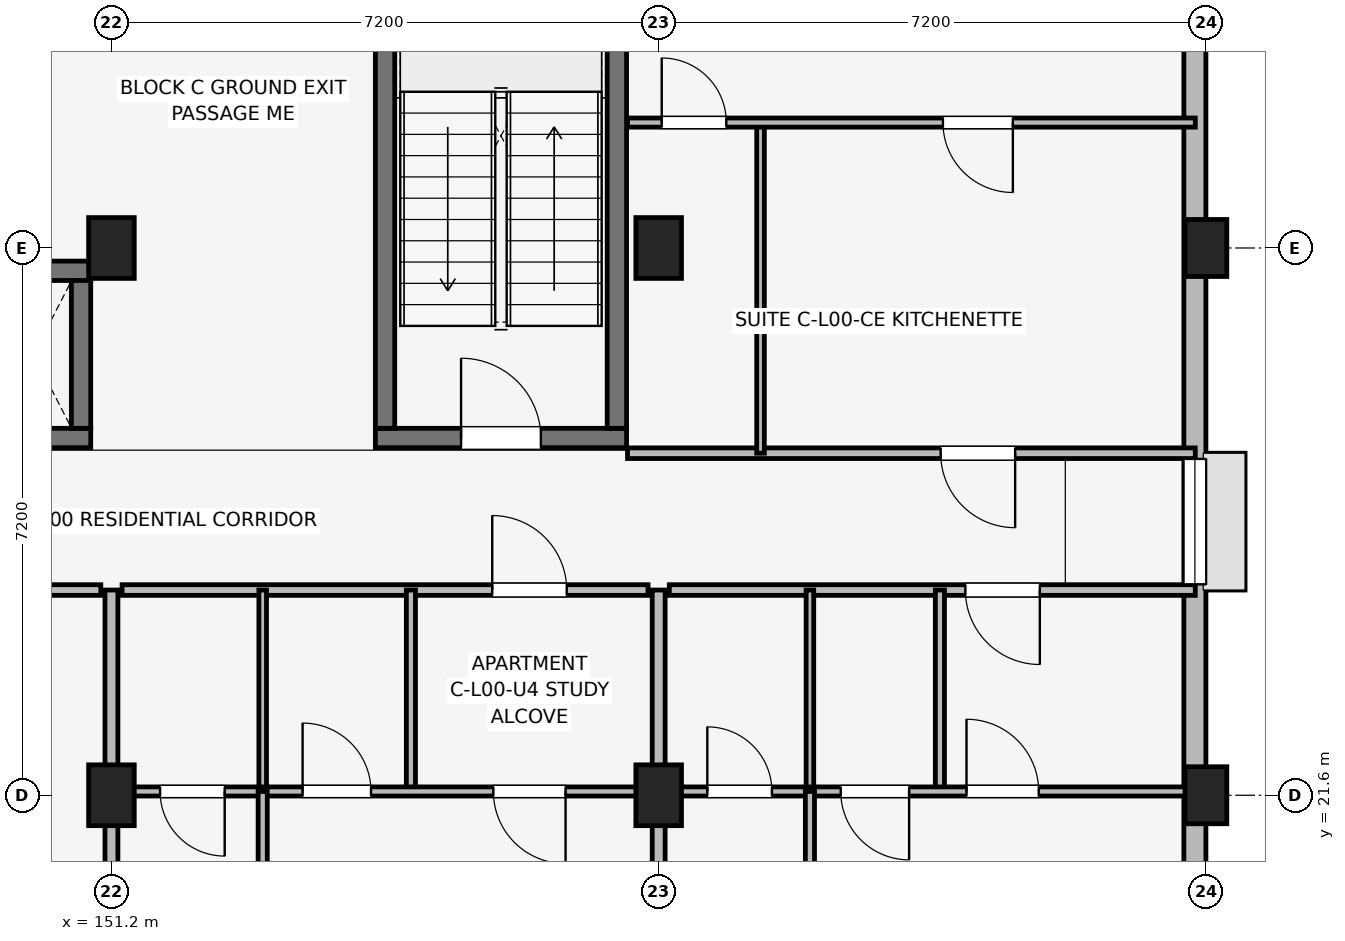
"""IFC4 building model, lengths in metres.
Left out: names, types, materials, properties, quantities, classifications, styles, units other than length and angle.
Written with IfcOpenShell. Run it as: python <this file> out.ifc"""

import sys

from ifc_helpers import new_model, si_unit, direction, frame, frame_2d, origin, origin_2d, place, context, subcontext, project, spatial, rectangle, extrude, element, fill, save


model = new_model("IFC4")
c1 = context("Model", 3, precision=1e-05, world=origin(), true_north=direction((0.0, 1.0)))
c2 = subcontext(c1, "Body", "Model", "MODEL_VIEW")
j1 = project(units=[si_unit("LENGTHUNIT", "METRE"), si_unit("PLANEANGLEUNIT", "RADIAN")], contexts=[c1])
p1 = place(None, origin())
s1 = spatial("IfcSite", under=j1, at=p1, CompositionType="ELEMENT")
p2 = place(p1, origin())
s2 = spatial("IfcBuilding", under=s1, at=p2, CompositionType="ELEMENT")
p3 = place(p2, origin())
s3 = spatial("IfcBuildingStorey", under=s2, at=p3, CompositionType="ELEMENT", Elevation=0.0)
for number, where, z_axis, x_axis in (
    (1, (151.2, 21.6, 0.0), (0.0, 0.0, 1.0), (1.0, 0.0, 0.0)),
    (2, (151.2, 28.8, 0.0), (0.0, 0.0, 1.0), (1.0, 0.0, 0.0)),
    (3, (158.4, 21.6, 0.0), (0.0, 0.0, 1.0), (1.0, 0.0, 0.0)),
    (4, (158.4, 28.8, 0.0), (0.0, 0.0, 1.0), (1.0, 0.0, 0.0)),
):
    element("IfcColumn", number, at=place(p3, frame(where, z_axis=z_axis, x_axis=x_axis)), inside=s3, PredefinedType="COLUMN", context=c2, shape_type="SweptSolid", body=[
        extrude(rectangle(XDim=0.6, YDim=0.8, at=origin_2d()), origin(), (0.0, 0.0, 1.0), 4.5),
    ])
for number, where, z_axis, x_axis in (
    (5, (165.6, 21.6, 0.0), (0.0, 0.0, 1.0), (1.0, 0.0, 0.0)),
    (6, (165.6, 28.8, 0.0), (0.0, 0.0, 1.0), (1.0, 0.0, 0.0)),
):
    element("IfcColumn", number, at=place(p3, frame(where, z_axis=z_axis, x_axis=x_axis)), inside=s3, PredefinedType="COLUMN", context=c2, shape_type="SweptSolid", body=[
        extrude(rectangle(XDim=0.55, YDim=0.75, at=origin_2d()), origin(), (0.0, 0.0, 1.0), 4.5),
    ])
p4 = place(p3, frame((154.673, 26.3, 0.0), z_axis=(0.0, 0.0, 1.0), x_axis=(1.0, 0.0, 0.0)))
e7 = element("IfcWall", 7, at=p4, inside=s3, PredefinedType="SHEAR", context=c2, shape_type="SweptSolid", body=[
    extrude(rectangle(XDim=3.305, YDim=0.255, at=frame_2d((1.652, 0.0))), origin(), (0.0, 0.0, 1.0), 4.5),
])
p5 = place(p4, frame((1.127, 0.0, 0.0)))
e8 = element("IfcOpeningElement", 8, at=p5, cuts=e7, PredefinedType="OPENING", context=c2, shape_type="SweptSolid", body=[
    extrude(rectangle(XDim=1.05, YDim=2.12, at=frame_2d((0.525, 1.06))), frame((0.0, 0.137, 0.0), z_axis=(0.0, -1.0, 0.0), x_axis=(1.0, 0.0, 0.0)), (0.0, 0.0, 1.0), 0.275),
])
for number, where, z_axis, x_axis in (
    (9, (154.8, 26.427, 0.0), (0.0, 0.0, 1.0), (0.0, 1.0, 0.0)),
    (10, (157.85, 26.427, 0.0), (0.0, 0.0, 1.0), (0.0, 1.0, 0.0)),
):
    element("IfcWall", number, at=place(p3, frame(where, z_axis=z_axis, x_axis=x_axis)), inside=s3, PredefinedType="SHEAR", context=c2, shape_type="SweptSolid", body=[
        extrude(rectangle(XDim=6.295, YDim=0.255, at=frame_2d((3.147, 0.0))), origin(), (0.0, 0.0, 1.0), 4.5),
    ])
for number, where, z_axis, x_axis in (
    (11, (149.123, 26.3, 0.0), (0.0, 0.0, 1.0), (1.0, 0.0, 0.0)),
    (12, (149.123, 28.5, 0.0), (0.0, 0.0, 1.0), (1.0, 0.0, 0.0)),
):
    element("IfcWall", number, at=place(p3, frame(where, z_axis=z_axis, x_axis=x_axis)), inside=s3, PredefinedType="SHEAR", context=c2, shape_type="SweptSolid", body=[
        extrude(rectangle(XDim=1.805, YDim=0.255, at=frame_2d((0.902, 0.0))), origin(), (0.0, 0.0, 1.0), 4.5),
    ])
p6 = place(p3, frame((150.8, 26.427, 0.0), z_axis=(0.0, 0.0, 1.0), x_axis=(0.0, 1.0, 0.0)))
e13 = element("IfcWall", 13, at=p6, inside=s3, PredefinedType="SHEAR", context=c2, shape_type="SweptSolid", body=[
    extrude(rectangle(XDim=1.945, YDim=0.255, at=frame_2d((0.973, 0.0))), origin(), (0.0, 0.0, 1.0), 4.5),
])
p7 = place(p3, frame((165.455, 17.4, 0.0), z_axis=(0.0, 0.0, 1.0), x_axis=(0.0, 1.0, 0.0)))
e14 = element("IfcWall", 14, at=p7, inside=s3, PredefinedType="SOLIDWALL", context=c2, shape_type="SweptSolid", body=[
    extrude(rectangle(XDim=15.6, YDim=0.29, at=frame_2d((7.8, 0.0))), origin(), (0.0, 0.0, 1.0), 3.38),
])
p8 = place(p7, frame((6.975, 0.0, 1.05)))
e15 = element("IfcOpeningElement", 15, at=p8, cuts=e14, PredefinedType="OPENING", context=c2, shape_type="SweptSolid", body=[
    extrude(rectangle(XDim=1.65, YDim=1.15, at=frame_2d((0.825, 0.575))), frame((0.0, 0.155, 0.0), z_axis=(0.0, -1.0, 0.0), x_axis=(1.0, 0.0, 0.0)), (0.0, 0.0, 1.0), 0.31),
])
p9 = place(p7, frame((1.288, 0.0, 0.75)))
e16 = element("IfcOpeningElement", 16, at=p9, cuts=e14, PredefinedType="OPENING", context=c2, shape_type="SweptSolid", body=[
    extrude(rectangle(XDim=1.42, YDim=1.6, at=frame_2d((0.71, 0.8))), frame((0.0, 0.155, 0.0), z_axis=(0.0, -1.0, 0.0), x_axis=(1.0, 0.0, 0.0)), (0.0, 0.0, 1.0), 0.31),
])
p10 = place(p3, frame((144.14, 24.3, 0.0), z_axis=(0.0, 0.0, 1.0), x_axis=(1.0, 0.0, 0.0)))
e17 = element("IfcWall", 17, at=p10, inside=s3, PredefinedType="PARTITIONING", context=c2, shape_type="SweptSolid", body=[
    extrude(rectangle(XDim=6.92, YDim=0.14, at=frame_2d((3.46, 0.0))), origin(), (0.0, 0.0, 1.0), 3.15),
])
p11 = place(p10, frame((1.25, 0.0, 0.0)))
e18 = element("IfcOpeningElement", 18, at=p11, cuts=e17, PredefinedType="OPENING", context=c2, shape_type="SweptSolid", body=[
    extrude(rectangle(XDim=1.4, YDim=2.22, at=frame_2d((0.7, 1.11))), frame((0.0, 0.08, 0.0), z_axis=(0.0, -1.0, 0.0), x_axis=(1.0, 0.0, 0.0)), (0.0, 0.0, 1.0), 0.16),
])
p12 = place(p10, frame((6.07, 0.0, 0.0), z_axis=(0.0, 0.0, 1.0), x_axis=(-1.0, 0.0, 0.0)))
e19 = element("IfcOpeningElement", 19, at=p12, cuts=e17, PredefinedType="OPENING", context=c2, shape_type="SweptSolid", body=[
    extrude(rectangle(XDim=1.0, YDim=2.12, at=frame_2d((0.5, 1.06))), frame((0.0, 0.08, 0.0), z_axis=(0.0, -1.0, 0.0), x_axis=(1.0, 0.0, 0.0)), (0.0, 0.0, 1.0), 0.16),
])
p13 = place(p3, frame((151.2, 14.7, 0.0), z_axis=(0.0, 0.0, 1.0), x_axis=(0.0, 1.0, 0.0)))
e20 = element("IfcWall", 20, at=p13, inside=s3, PredefinedType="PARTITIONING", context=c2, shape_type="SweptSolid", body=[
    extrude(rectangle(XDim=9.6, YDim=0.17, at=frame_2d((4.8, 0.0))), origin(), (0.0, 0.0, 1.0), 3.15),
])
p14 = place(p3, frame((151.34, 24.3, 0.0), z_axis=(0.0, 0.0, 1.0), x_axis=(1.0, 0.0, 0.0)))
e21 = element("IfcWall", 21, at=p14, inside=s3, PredefinedType="PARTITIONING", context=c2, shape_type="SweptSolid", body=[
    extrude(rectangle(XDim=6.92, YDim=0.14, at=frame_2d((3.46, 0.0))), origin(), (0.0, 0.0, 1.0), 3.15),
])
p15 = place(p14, frame((4.87, 0.0, 0.0)))
e22 = element("IfcOpeningElement", 22, at=p15, cuts=e21, PredefinedType="OPENING", context=c2, shape_type="SweptSolid", body=[
    extrude(rectangle(XDim=0.98, YDim=2.1, at=frame_2d((0.49, 1.05))), frame((0.0, 0.08, 0.0), z_axis=(0.0, -1.0, 0.0), x_axis=(1.0, 0.0, 0.0)), (0.0, 0.0, 1.0), 0.16),
])
p16 = place(p3, frame((153.19, 21.65, 0.0), z_axis=(0.0, 0.0, 1.0), x_axis=(0.0, 1.0, 0.0)))
e23 = element("IfcWall", 23, at=p16, inside=s3, PredefinedType="PARTITIONING", context=c2, shape_type="SweptSolid", body=[
    extrude(rectangle(XDim=2.65, YDim=0.1, at=frame_2d((1.325, 0.0))), origin(), (0.0, 0.0, 1.0), 3.15),
])
p17 = place(p3, frame((155.14, 21.65, 0.0), z_axis=(0.0, 0.0, 1.0), x_axis=(0.0, 1.0, 0.0)))
e24 = element("IfcWall", 24, at=p17, inside=s3, PredefinedType="PARTITIONING", context=c2, shape_type="SweptSolid", body=[
    extrude(rectangle(XDim=2.65, YDim=0.12, at=frame_2d((1.325, 0.0))), origin(), (0.0, 0.0, 1.0), 3.15),
])
p18 = place(p3, frame((151.34, 21.65, 0.0), z_axis=(0.0, 0.0, 1.0), x_axis=(1.0, 0.0, 0.0)))
e25 = element("IfcWall", 25, at=p18, inside=s3, PredefinedType="PARTITIONING", context=c2, shape_type="SweptSolid", body=[
    extrude(rectangle(XDim=6.92, YDim=0.12, at=frame_2d((3.46, 0.0))), origin(), (0.0, 0.0, 1.0), 3.15),
])
p19 = place(p18, frame((1.35, 0.0, 0.0), z_axis=(0.0, 0.0, 1.0), x_axis=(-1.0, 0.0, 0.0)))
e26 = element("IfcOpeningElement", 26, at=p19, cuts=e25, PredefinedType="OPENING", context=c2, shape_type="SweptSolid", body=[
    extrude(rectangle(XDim=0.85, YDim=2.08, at=frame_2d((0.425, 1.04))), frame((0.0, 0.07, 0.0), z_axis=(0.0, -1.0, 0.0), x_axis=(1.0, 0.0, 0.0)), (0.0, 0.0, 1.0), 0.14),
])
p20 = place(p18, frame((2.375, 0.0, 0.0)))
e27 = element("IfcOpeningElement", 27, at=p20, cuts=e25, PredefinedType="OPENING", context=c2, shape_type="SweptSolid", body=[
    extrude(rectangle(XDim=0.9, YDim=2.08, at=frame_2d((0.45, 1.04))), frame((0.0, 0.07, 0.0), z_axis=(0.0, -1.0, 0.0), x_axis=(1.0, 0.0, 0.0)), (0.0, 0.0, 1.0), 0.14),
])
p21 = place(p18, frame((5.835, 0.0, 0.0), z_axis=(0.0, 0.0, 1.0), x_axis=(-1.0, 0.0, 0.0)))
e28 = element("IfcOpeningElement", 28, at=p21, cuts=e25, PredefinedType="OPENING", context=c2, shape_type="SweptSolid", body=[
    extrude(rectangle(XDim=0.95, YDim=2.08, at=frame_2d((0.475, 1.04))), frame((0.0, 0.07, 0.0), z_axis=(0.0, -1.0, 0.0), x_axis=(1.0, 0.0, 0.0)), (0.0, 0.0, 1.0), 0.14),
])
p22 = place(p3, frame((153.19, 14.7, 0.0), z_axis=(0.0, 0.0, 1.0), x_axis=(0.0, 1.0, 0.0)))
e29 = element("IfcWall", 29, at=p22, inside=s3, PredefinedType="PARTITIONING", context=c2, shape_type="SweptSolid", body=[
    extrude(rectangle(XDim=6.95, YDim=0.12, at=frame_2d((3.475, 0.0))), origin(), (0.0, 0.0, 1.0), 3.15),
])
p23 = place(p22, frame((3.025, 0.0, 0.0)))
e30 = element("IfcOpeningElement", 30, at=p23, cuts=e29, PredefinedType="OPENING", context=c2, shape_type="SweptSolid", body=[
    extrude(rectangle(XDim=0.9, YDim=2.08, at=frame_2d((0.45, 1.04))), frame((0.0, 0.07, 0.0), z_axis=(0.0, -1.0, 0.0), x_axis=(1.0, 0.0, 0.0)), (0.0, 0.0, 1.0), 0.14),
])
p24 = place(p3, frame((158.4, 14.7, 0.0), z_axis=(0.0, 0.0, 1.0), x_axis=(0.0, 1.0, 0.0)))
e31 = element("IfcWall", 31, at=p24, inside=s3, PredefinedType="PARTITIONING", context=c2, shape_type="SweptSolid", body=[
    extrude(rectangle(XDim=9.6, YDim=0.17, at=frame_2d((4.8, 0.0))), origin(), (0.0, 0.0, 1.0), 3.15),
])
p25 = place(p3, frame((158.54, 24.3, 0.0), z_axis=(0.0, 0.0, 1.0), x_axis=(1.0, 0.0, 0.0)))
e32 = element("IfcWall", 32, at=p25, inside=s3, PredefinedType="PARTITIONING", context=c2, shape_type="SweptSolid", body=[
    extrude(rectangle(XDim=6.92, YDim=0.14, at=frame_2d((3.46, 0.0))), origin(), (0.0, 0.0, 1.0), 3.15),
])
p26 = place(p25, frame((4.875, 0.0, 0.0), z_axis=(0.0, 0.0, 1.0), x_axis=(-1.0, 0.0, 0.0)))
e33 = element("IfcOpeningElement", 33, at=p26, cuts=e32, PredefinedType="OPENING", context=c2, shape_type="SweptSolid", body=[
    extrude(rectangle(XDim=0.98, YDim=2.1, at=frame_2d((0.49, 1.05))), frame((0.0, 0.08, 0.0), z_axis=(0.0, -1.0, 0.0), x_axis=(1.0, 0.0, 0.0)), (0.0, 0.0, 1.0), 0.16),
])
p27 = place(p3, frame((160.39, 21.65, 0.0), z_axis=(0.0, 0.0, 1.0), x_axis=(0.0, 1.0, 0.0)))
e34 = element("IfcWall", 34, at=p27, inside=s3, PredefinedType="PARTITIONING", context=c2, shape_type="SweptSolid", body=[
    extrude(rectangle(XDim=2.65, YDim=0.1, at=frame_2d((1.325, 0.0))), origin(), (0.0, 0.0, 1.0), 3.15),
])
p28 = place(p3, frame((162.1, 21.65, 0.0), z_axis=(0.0, 0.0, 1.0), x_axis=(0.0, 1.0, 0.0)))
e35 = element("IfcWall", 35, at=p28, inside=s3, PredefinedType="PARTITIONING", context=c2, shape_type="SweptSolid", body=[
    extrude(rectangle(XDim=2.65, YDim=0.12, at=frame_2d((1.325, 0.0))), origin(), (0.0, 0.0, 1.0), 3.15),
])
p29 = place(p3, frame((158.54, 21.65, 0.0), z_axis=(0.0, 0.0, 1.0), x_axis=(1.0, 0.0, 0.0)))
e36 = element("IfcWall", 36, at=p29, inside=s3, PredefinedType="PARTITIONING", context=c2, shape_type="SweptSolid", body=[
    extrude(rectangle(XDim=6.92, YDim=0.12, at=frame_2d((3.46, 0.0))), origin(), (0.0, 0.0, 1.0), 3.15),
])
p30 = place(p29, frame((0.5, 0.0, 0.0)))
e37 = element("IfcOpeningElement", 37, at=p30, cuts=e36, PredefinedType="OPENING", context=c2, shape_type="SweptSolid", body=[
    extrude(rectangle(XDim=0.85, YDim=2.08, at=frame_2d((0.425, 1.04))), frame((0.0, 0.07, 0.0), z_axis=(0.0, -1.0, 0.0), x_axis=(1.0, 0.0, 0.0)), (0.0, 0.0, 1.0), 0.14),
])
p31 = place(p29, frame((3.155, 0.0, 0.0), z_axis=(0.0, 0.0, 1.0), x_axis=(-1.0, 0.0, 0.0)))
e38 = element("IfcOpeningElement", 38, at=p31, cuts=e36, PredefinedType="OPENING", context=c2, shape_type="SweptSolid", body=[
    extrude(rectangle(XDim=0.9, YDim=2.08, at=frame_2d((0.45, 1.04))), frame((0.0, 0.07, 0.0), z_axis=(0.0, -1.0, 0.0), x_axis=(1.0, 0.0, 0.0)), (0.0, 0.0, 1.0), 0.14),
])
p32 = place(p29, frame((3.91, 0.0, 0.0)))
e39 = element("IfcOpeningElement", 39, at=p32, cuts=e36, PredefinedType="OPENING", context=c2, shape_type="SweptSolid", body=[
    extrude(rectangle(XDim=0.95, YDim=2.08, at=frame_2d((0.475, 1.04))), frame((0.0, 0.07, 0.0), z_axis=(0.0, -1.0, 0.0), x_axis=(1.0, 0.0, 0.0)), (0.0, 0.0, 1.0), 0.14),
])
p33 = place(p3, frame((160.39, 14.7, 0.0), z_axis=(0.0, 0.0, 1.0), x_axis=(0.0, 1.0, 0.0)))
e40 = element("IfcWall", 40, at=p33, inside=s3, PredefinedType="PARTITIONING", context=c2, shape_type="SweptSolid", body=[
    extrude(rectangle(XDim=6.95, YDim=0.12, at=frame_2d((3.475, 0.0))), origin(), (0.0, 0.0, 1.0), 3.15),
])
p34 = place(p33, frame((3.025, 0.0, 0.0)))
e41 = element("IfcOpeningElement", 41, at=p34, cuts=e40, PredefinedType="OPENING", context=c2, shape_type="SweptSolid", body=[
    extrude(rectangle(XDim=0.9, YDim=2.08, at=frame_2d((0.45, 1.04))), frame((0.0, 0.07, 0.0), z_axis=(0.0, -1.0, 0.0), x_axis=(1.0, 0.0, 0.0)), (0.0, 0.0, 1.0), 0.14),
])
p35 = place(p3, frame((157.99, 26.1, 0.0), z_axis=(0.0, 0.0, 1.0), x_axis=(1.0, 0.0, 0.0)))
e42 = element("IfcWall", 42, at=p35, inside=s3, PredefinedType="PARTITIONING", context=c2, shape_type="SweptSolid", body=[
    extrude(rectangle(XDim=7.47, YDim=0.14, at=frame_2d((3.735, 0.0))), origin(), (0.0, 0.0, 1.0), 3.15),
])
p36 = place(p35, frame((5.1, 0.0, 0.0), z_axis=(0.0, 0.0, 1.0), x_axis=(-1.0, 0.0, 0.0)))
e43 = element("IfcOpeningElement", 43, at=p36, cuts=e42, PredefinedType="OPENING", context=c2, shape_type="SweptSolid", body=[
    extrude(rectangle(XDim=0.98, YDim=2.1, at=frame_2d((0.49, 1.05))), frame((0.0, 0.08, 0.0), z_axis=(0.0, -1.0, 0.0), x_axis=(1.0, 0.0, 0.0)), (0.0, 0.0, 1.0), 0.16),
])
p37 = place(p3, frame((159.74, 26.1, 0.0), z_axis=(0.0, 0.0, 1.0), x_axis=(0.0, 1.0, 0.0)))
e44 = element("IfcWall", 44, at=p37, inside=s3, PredefinedType="PARTITIONING", context=c2, shape_type="SweptSolid", body=[
    extrude(rectangle(XDim=4.35, YDim=0.1, at=frame_2d((2.175, 0.0))), origin(), (0.0, 0.0, 1.0), 3.15),
])
p38 = place(p3, frame((157.99, 30.45, 0.0), z_axis=(0.0, 0.0, 1.0), x_axis=(1.0, 0.0, 0.0)))
e45 = element("IfcWall", 45, at=p38, inside=s3, PredefinedType="PARTITIONING", context=c2, shape_type="SweptSolid", body=[
    extrude(rectangle(XDim=7.47, YDim=0.12, at=frame_2d((3.735, 0.0))), origin(), (0.0, 0.0, 1.0), 3.15),
])
p39 = place(p38, frame((0.45, 0.0, 0.0)))
e46 = element("IfcOpeningElement", 46, at=p39, cuts=e45, PredefinedType="OPENING", context=c2, shape_type="SweptSolid", body=[
    extrude(rectangle(XDim=0.85, YDim=2.08, at=frame_2d((0.425, 1.04))), frame((0.0, 0.07, 0.0), z_axis=(0.0, -1.0, 0.0), x_axis=(1.0, 0.0, 0.0)), (0.0, 0.0, 1.0), 0.14),
])
p40 = place(p38, frame((5.07, 0.0, 0.0), z_axis=(0.0, 0.0, 1.0), x_axis=(-1.0, 0.0, 0.0)))
e47 = element("IfcOpeningElement", 47, at=p40, cuts=e45, PredefinedType="OPENING", context=c2, shape_type="SweptSolid", body=[
    extrude(rectangle(XDim=0.92, YDim=2.08, at=frame_2d((0.46, 1.04))), frame((0.0, 0.07, 0.0), z_axis=(0.0, -1.0, 0.0), x_axis=(1.0, 0.0, 0.0)), (0.0, 0.0, 1.0), 0.14),
])
p41 = place(p8, origin())
e48 = element("IfcWindow", 48, at=p41, inside=s3, PartitioningType="SINGLE_PANEL", PredefinedType="WINDOW", context=c2, shape_type="SweptSolid", body=[
    extrude(rectangle(XDim=1.65, YDim=1.15, at=frame_2d((0.825, 0.575))), frame((0.0, 0.03, 0.0), z_axis=(0.0, -1.0, 0.0), x_axis=(1.0, 0.0, 0.0)), (0.0, 0.0, 1.0), 0.06),
])
fill(e15, e48)
p42 = place(p15, origin())
e49 = element("IfcDoor", 49, at=p42, inside=s3, OperationType="SINGLE_SWING_LEFT", PredefinedType="DOOR", context=c2, shape_type="SweptSolid", body=[
    extrude(rectangle(XDim=0.98, YDim=2.1, at=frame_2d((0.49, 1.05))), frame((0.0, 0.025, 0.0), z_axis=(0.0, -1.0, 0.0), x_axis=(1.0, 0.0, 0.0)), (0.0, 0.0, 1.0), 0.05),
])
fill(e22, e49)
p43 = place(p19, origin())
e50 = element("IfcDoor", 50, at=p43, inside=s3, OperationType="SINGLE_SWING_RIGHT", PredefinedType="DOOR", context=c2, shape_type="SweptSolid", body=[
    extrude(rectangle(XDim=0.85, YDim=2.08, at=frame_2d((0.425, 1.04))), frame((0.0, 0.025, 0.0), z_axis=(0.0, -1.0, 0.0), x_axis=(1.0, 0.0, 0.0)), (0.0, 0.0, 1.0), 0.05),
])
fill(e26, e50)
p44 = place(p20, origin())
e51 = element("IfcDoor", 51, at=p44, inside=s3, OperationType="SINGLE_SWING_LEFT", PredefinedType="DOOR", context=c2, shape_type="SweptSolid", body=[
    extrude(rectangle(XDim=0.9, YDim=2.08, at=frame_2d((0.45, 1.04))), frame((0.0, 0.025, 0.0), z_axis=(0.0, -1.0, 0.0), x_axis=(1.0, 0.0, 0.0)), (0.0, 0.0, 1.0), 0.05),
])
fill(e27, e51)
p45 = place(p21, origin())
e52 = element("IfcDoor", 52, at=p45, inside=s3, OperationType="SINGLE_SWING_RIGHT", PredefinedType="DOOR", context=c2, shape_type="SweptSolid", body=[
    extrude(rectangle(XDim=0.95, YDim=2.08, at=frame_2d((0.475, 1.04))), frame((0.0, 0.025, 0.0), z_axis=(0.0, -1.0, 0.0), x_axis=(1.0, 0.0, 0.0)), (0.0, 0.0, 1.0), 0.05),
])
fill(e28, e52)
p46 = place(p26, origin())
e53 = element("IfcDoor", 53, at=p46, inside=s3, OperationType="SINGLE_SWING_RIGHT", PredefinedType="DOOR", context=c2, shape_type="SweptSolid", body=[
    extrude(rectangle(XDim=0.98, YDim=2.1, at=frame_2d((0.49, 1.05))), frame((0.0, 0.025, 0.0), z_axis=(0.0, -1.0, 0.0), x_axis=(1.0, 0.0, 0.0)), (0.0, 0.0, 1.0), 0.05),
])
fill(e33, e53)
p47 = place(p30, origin())
e54 = element("IfcDoor", 54, at=p47, inside=s3, OperationType="SINGLE_SWING_LEFT", PredefinedType="DOOR", context=c2, shape_type="SweptSolid", body=[
    extrude(rectangle(XDim=0.85, YDim=2.08, at=frame_2d((0.425, 1.04))), frame((0.0, 0.025, 0.0), z_axis=(0.0, -1.0, 0.0), x_axis=(1.0, 0.0, 0.0)), (0.0, 0.0, 1.0), 0.05),
])
fill(e37, e54)
p48 = place(p31, origin())
e55 = element("IfcDoor", 55, at=p48, inside=s3, OperationType="SINGLE_SWING_RIGHT", PredefinedType="DOOR", context=c2, shape_type="SweptSolid", body=[
    extrude(rectangle(XDim=0.9, YDim=2.08, at=frame_2d((0.45, 1.04))), frame((0.0, 0.025, 0.0), z_axis=(0.0, -1.0, 0.0), x_axis=(1.0, 0.0, 0.0)), (0.0, 0.0, 1.0), 0.05),
])
fill(e38, e55)
p49 = place(p32, origin())
e56 = element("IfcDoor", 56, at=p49, inside=s3, OperationType="SINGLE_SWING_LEFT", PredefinedType="DOOR", context=c2, shape_type="SweptSolid", body=[
    extrude(rectangle(XDim=0.95, YDim=2.08, at=frame_2d((0.475, 1.04))), frame((0.0, 0.025, 0.0), z_axis=(0.0, -1.0, 0.0), x_axis=(1.0, 0.0, 0.0)), (0.0, 0.0, 1.0), 0.05),
])
fill(e39, e56)
p50 = place(p36, origin())
e57 = element("IfcDoor", 57, at=p50, inside=s3, OperationType="SINGLE_SWING_RIGHT", PredefinedType="DOOR", context=c2, shape_type="SweptSolid", body=[
    extrude(rectangle(XDim=0.98, YDim=2.1, at=frame_2d((0.49, 1.05))), frame((0.0, 0.025, 0.0), z_axis=(0.0, -1.0, 0.0), x_axis=(1.0, 0.0, 0.0)), (0.0, 0.0, 1.0), 0.05),
])
fill(e43, e57)
p51 = place(p39, origin())
e58 = element("IfcDoor", 58, at=p51, inside=s3, OperationType="SINGLE_SWING_LEFT", PredefinedType="DOOR", context=c2, shape_type="SweptSolid", body=[
    extrude(rectangle(XDim=0.85, YDim=2.08, at=frame_2d((0.425, 1.04))), frame((0.0, 0.025, 0.0), z_axis=(0.0, -1.0, 0.0), x_axis=(1.0, 0.0, 0.0)), (0.0, 0.0, 1.0), 0.05),
])
fill(e46, e58)
p52 = place(p40, origin())
e59 = element("IfcDoor", 59, at=p52, inside=s3, OperationType="SINGLE_SWING_RIGHT", PredefinedType="DOOR", context=c2, shape_type="SweptSolid", body=[
    extrude(rectangle(XDim=0.92, YDim=2.08, at=frame_2d((0.46, 1.04))), frame((0.0, 0.025, 0.0), z_axis=(0.0, -1.0, 0.0), x_axis=(1.0, 0.0, 0.0)), (0.0, 0.0, 1.0), 0.05),
])
fill(e47, e59)
p53 = place(p5, origin())
e60 = element("IfcDoor", 60, at=p53, inside=s3, OperationType="SINGLE_SWING_LEFT", PredefinedType="DOOR", context=c2, shape_type="SweptSolid", body=[
    extrude(rectangle(XDim=1.05, YDim=2.12, at=frame_2d((0.525, 1.06))), frame((0.0, 0.025, 0.0), z_axis=(0.0, -1.0, 0.0), x_axis=(1.0, 0.0, 0.0)), (0.0, 0.0, 1.0), 0.05),
])
fill(e8, e60)
save(model, sys.argv[1])
